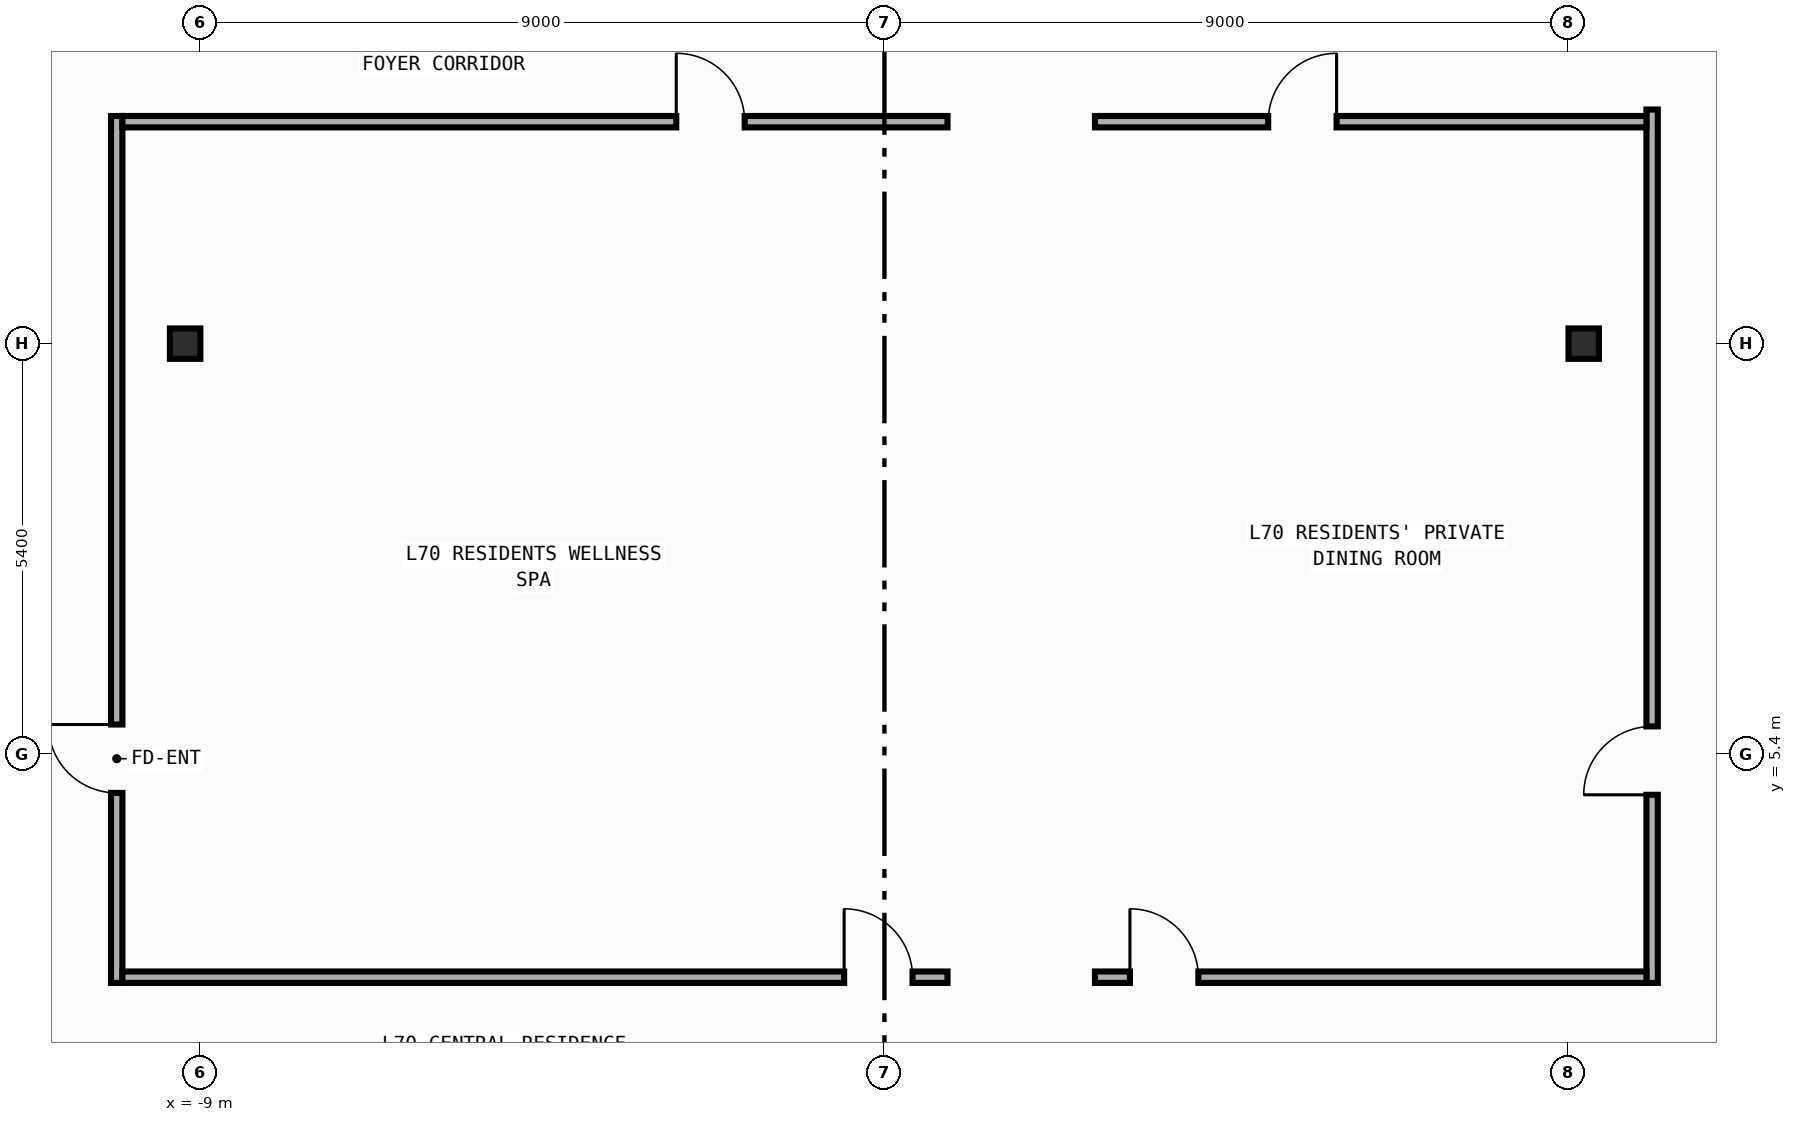
"""IFC4 building model, lengths in metres.
Left out: names, types, materials, properties, quantities, classifications, styles, units other than length and angle.
Written with IfcOpenShell. Run it as: python <this file> out.ifc"""

import sys

from ifc_helpers import new_model, si_unit, direction, frame, frame_2d, origin, origin_2d, place, context, subcontext, project, spatial, rectangle, i_section, extrude, element, fill, save


model = new_model("IFC4")
c1 = context("Model", 3, precision=1e-05, world=origin(), true_north=direction((0.0, 1.0)))
c2 = subcontext(c1, "Body", "Model", "MODEL_VIEW")
j1 = project(units=[si_unit("LENGTHUNIT", "METRE"), si_unit("PLANEANGLEUNIT", "RADIAN")], contexts=[c1])
p1 = place(None, origin())
s1 = spatial("IfcSite", under=j1, at=p1, CompositionType="ELEMENT")
p2 = place(p1, origin())
s2 = spatial("IfcBuilding", under=s1, at=p2, CompositionType="ELEMENT")
p3 = place(p2, frame((0.0, 0.0, 292.8)))
s3 = spatial("IfcBuildingStorey", under=s2, at=p3, CompositionType="ELEMENT", Elevation=292.8)
for number, where, z_axis, x_axis in (
    (1, (-9.2, 10.8, 0.0), (0.0, 0.0, 1.0), (1.0, 0.0, 0.0)),
    (2, (9.2, 10.8, 0.0), (0.0, 0.0, 1.0), (1.0, 0.0, 0.0)),
):
    element("IfcColumn", number, at=place(p3, frame(where, z_axis=z_axis, x_axis=x_axis)), inside=s3, PredefinedType="COLUMN", context=c2, shape_type="SweptSolid", body=[
        extrude(i_section(OverallWidth=0.4, OverallDepth=0.4, WebThickness=0.013, FlangeThickness=0.021, FilletRadius=0.022, at=origin_2d()), origin(), (0.0, 0.0, 1.0), 3.8),
    ])
p4 = place(p3, frame((-10.1, 2.39, 0.0), z_axis=(0.0, 0.0, 1.0), x_axis=(0.0, 1.0, 0.0)))
e3 = element("IfcWall", 3, at=p4, inside=s3, PredefinedType="PARTITIONING", context=c2, shape_type="SweptSolid", body=[
    extrude(rectangle(XDim=11.405, YDim=0.15, at=frame_2d((5.703, 0.0))), origin(), (0.0, 0.0, 1.0), 3.54),
])
p5 = place(p4, frame((2.5, 0.0, 0.0)))
e4 = element("IfcOpeningElement", 4, at=p5, cuts=e3, PredefinedType="OPENING", context=c2, shape_type="SweptSolid", body=[
    extrude(rectangle(XDim=0.9, YDim=2.15, at=frame_2d((0.45, 1.075))), frame((0.0, 0.085, 0.0), z_axis=(0.0, -1.0, 0.0), x_axis=(1.0, 0.0, 0.0)), (0.0, 0.0, 1.0), 0.17),
])
p6 = place(p3, frame((10.1, 2.39, 0.0), z_axis=(0.0, 0.0, 1.0), x_axis=(0.0, 1.0, 0.0)))
e5 = element("IfcWall", 5, at=p6, inside=s3, PredefinedType="PARTITIONING", context=c2, shape_type="SweptSolid", body=[
    extrude(rectangle(XDim=11.49, YDim=0.15, at=frame_2d((5.745, 0.0))), origin(), (0.0, 0.0, 1.0), 3.54),
])
p7 = place(p6, frame((2.475, 0.0, 0.0)))
e6 = element("IfcOpeningElement", 6, at=p7, cuts=e5, PredefinedType="OPENING", context=c2, shape_type="SweptSolid", body=[
    extrude(rectangle(XDim=0.9, YDim=2.15, at=frame_2d((0.45, 1.075))), frame((0.0, 0.085, 0.0), z_axis=(0.0, -1.0, 0.0), x_axis=(1.0, 0.0, 0.0)), (0.0, 0.0, 1.0), 0.17),
])
p8 = place(p3, frame((-10.025, 2.465, 0.0), z_axis=(0.0, 0.0, 1.0), x_axis=(1.0, 0.0, 0.0)))
e7 = element("IfcWall", 7, at=p8, inside=s3, PredefinedType="PARTITIONING", context=c2, shape_type="SweptSolid", body=[
    extrude(rectangle(XDim=10.855, YDim=0.15, at=frame_2d((5.427, 0.0))), origin(), (0.0, 0.0, 1.0), 3.54),
])
p9 = place(p8, frame((9.495, 0.0, 0.0)))
e8 = element("IfcOpeningElement", 8, at=p9, cuts=e7, PredefinedType="OPENING", context=c2, shape_type="SweptSolid", body=[
    extrude(rectangle(XDim=0.9, YDim=2.15, at=frame_2d((0.45, 1.075))), frame((0.0, 0.085, 0.0), z_axis=(0.0, -1.0, 0.0), x_axis=(1.0, 0.0, 0.0)), (0.0, 0.0, 1.0), 0.17),
])
p10 = place(p3, frame((2.77, 2.465, 0.0), z_axis=(0.0, 0.0, 1.0), x_axis=(1.0, 0.0, 0.0)))
e9 = element("IfcWall", 9, at=p10, inside=s3, PredefinedType="PARTITIONING", context=c2, shape_type="SweptSolid", body=[
    extrude(rectangle(XDim=7.255, YDim=0.15, at=frame_2d((3.627, 0.0))), origin(), (0.0, 0.0, 1.0), 3.54),
])
p11 = place(p10, frame((0.46, 0.0, 0.0)))
e10 = element("IfcOpeningElement", 10, at=p11, cuts=e9, PredefinedType="OPENING", context=c2, shape_type="SweptSolid", body=[
    extrude(rectangle(XDim=0.9, YDim=2.15, at=frame_2d((0.45, 1.075))), frame((0.0, 0.085, 0.0), z_axis=(0.0, -1.0, 0.0), x_axis=(1.0, 0.0, 0.0)), (0.0, 0.0, 1.0), 0.17),
])
p12 = place(p3, frame((-10.025, 13.72, 0.0), z_axis=(0.0, 0.0, 1.0), x_axis=(1.0, 0.0, 0.0)))
e11 = element("IfcWall", 11, at=p12, inside=s3, PredefinedType="PARTITIONING", context=c2, shape_type="SweptSolid", body=[
    extrude(rectangle(XDim=10.855, YDim=0.15, at=frame_2d((5.427, 0.0))), origin(), (0.0, 0.0, 1.0), 3.54),
])
p13 = place(p12, frame((7.286, 0.0, 0.0)))
e12 = element("IfcOpeningElement", 12, at=p13, cuts=e11, PredefinedType="OPENING", context=c2, shape_type="SweptSolid", body=[
    extrude(rectangle(XDim=0.9, YDim=2.15, at=frame_2d((0.45, 1.075))), frame((0.0, 0.085, 0.0), z_axis=(0.0, -1.0, 0.0), x_axis=(1.0, 0.0, 0.0)), (0.0, 0.0, 1.0), 0.17),
])
p14 = place(p3, frame((2.77, 13.72, 0.0), z_axis=(0.0, 0.0, 1.0), x_axis=(1.0, 0.0, 0.0)))
e13 = element("IfcWall", 13, at=p14, inside=s3, PredefinedType="PARTITIONING", context=c2, shape_type="SweptSolid", body=[
    extrude(rectangle(XDim=7.255, YDim=0.15, at=frame_2d((3.627, 0.0))), origin(), (0.0, 0.0, 1.0), 3.54),
])
p15 = place(p14, frame((2.279, 0.0, 0.0)))
e14 = element("IfcOpeningElement", 14, at=p15, cuts=e13, PredefinedType="OPENING", context=c2, shape_type="SweptSolid", body=[
    extrude(rectangle(XDim=0.9, YDim=2.15, at=frame_2d((0.45, 1.075))), frame((0.0, 0.085, 0.0), z_axis=(0.0, -1.0, 0.0), x_axis=(1.0, 0.0, 0.0)), (0.0, 0.0, 1.0), 0.17),
])
p16 = place(p5, origin())
e15 = element("IfcDoor", 15, at=p16, inside=s3, OperationType="SINGLE_SWING_RIGHT", PredefinedType="DOOR", context=c2, shape_type="SweptSolid", body=[
    extrude(rectangle(XDim=0.9, YDim=2.15, at=frame_2d((0.45, 1.075))), frame((0.0, 0.025, 0.0), z_axis=(0.0, -1.0, 0.0), x_axis=(1.0, 0.0, 0.0)), (0.0, 0.0, 1.0), 0.05),
])
fill(e4, e15)
p17 = place(p7, origin())
e16 = element("IfcDoor", 16, at=p17, inside=s3, OperationType="SINGLE_SWING_LEFT", PredefinedType="DOOR", context=c2, shape_type="SweptSolid", body=[
    extrude(rectangle(XDim=0.9, YDim=2.15, at=frame_2d((0.45, 1.075))), frame((0.0, 0.025, 0.0), z_axis=(0.0, -1.0, 0.0), x_axis=(1.0, 0.0, 0.0)), (0.0, 0.0, 1.0), 0.05),
])
fill(e6, e16)
p18 = place(p9, origin())
e17 = element("IfcDoor", 17, at=p18, inside=s3, OperationType="SINGLE_SWING_LEFT", PredefinedType="DOOR", context=c2, shape_type="SweptSolid", body=[
    extrude(rectangle(XDim=0.9, YDim=2.15, at=frame_2d((0.45, 1.075))), frame((0.0, 0.025, 0.0), z_axis=(0.0, -1.0, 0.0), x_axis=(1.0, 0.0, 0.0)), (0.0, 0.0, 1.0), 0.05),
])
fill(e8, e17)
p19 = place(p11, origin())
e18 = element("IfcDoor", 18, at=p19, inside=s3, OperationType="SINGLE_SWING_LEFT", PredefinedType="DOOR", context=c2, shape_type="SweptSolid", body=[
    extrude(rectangle(XDim=0.9, YDim=2.15, at=frame_2d((0.45, 1.075))), frame((0.0, 0.025, 0.0), z_axis=(0.0, -1.0, 0.0), x_axis=(1.0, 0.0, 0.0)), (0.0, 0.0, 1.0), 0.05),
])
fill(e10, e18)
p20 = place(p13, origin())
e19 = element("IfcDoor", 19, at=p20, inside=s3, OperationType="SINGLE_SWING_LEFT", PredefinedType="DOOR", context=c2, shape_type="SweptSolid", body=[
    extrude(rectangle(XDim=0.9, YDim=2.15, at=frame_2d((0.45, 1.075))), frame((0.0, 0.025, 0.0), z_axis=(0.0, -1.0, 0.0), x_axis=(1.0, 0.0, 0.0)), (0.0, 0.0, 1.0), 0.05),
])
fill(e12, e19)
p21 = place(p15, origin())
e20 = element("IfcDoor", 20, at=p21, inside=s3, OperationType="SINGLE_SWING_RIGHT", PredefinedType="DOOR", context=c2, shape_type="SweptSolid", body=[
    extrude(rectangle(XDim=0.9, YDim=2.15, at=frame_2d((0.45, 1.075))), frame((0.0, 0.025, 0.0), z_axis=(0.0, -1.0, 0.0), x_axis=(1.0, 0.0, 0.0)), (0.0, 0.0, 1.0), 0.05),
])
fill(e14, e20)
save(model, sys.argv[1])
